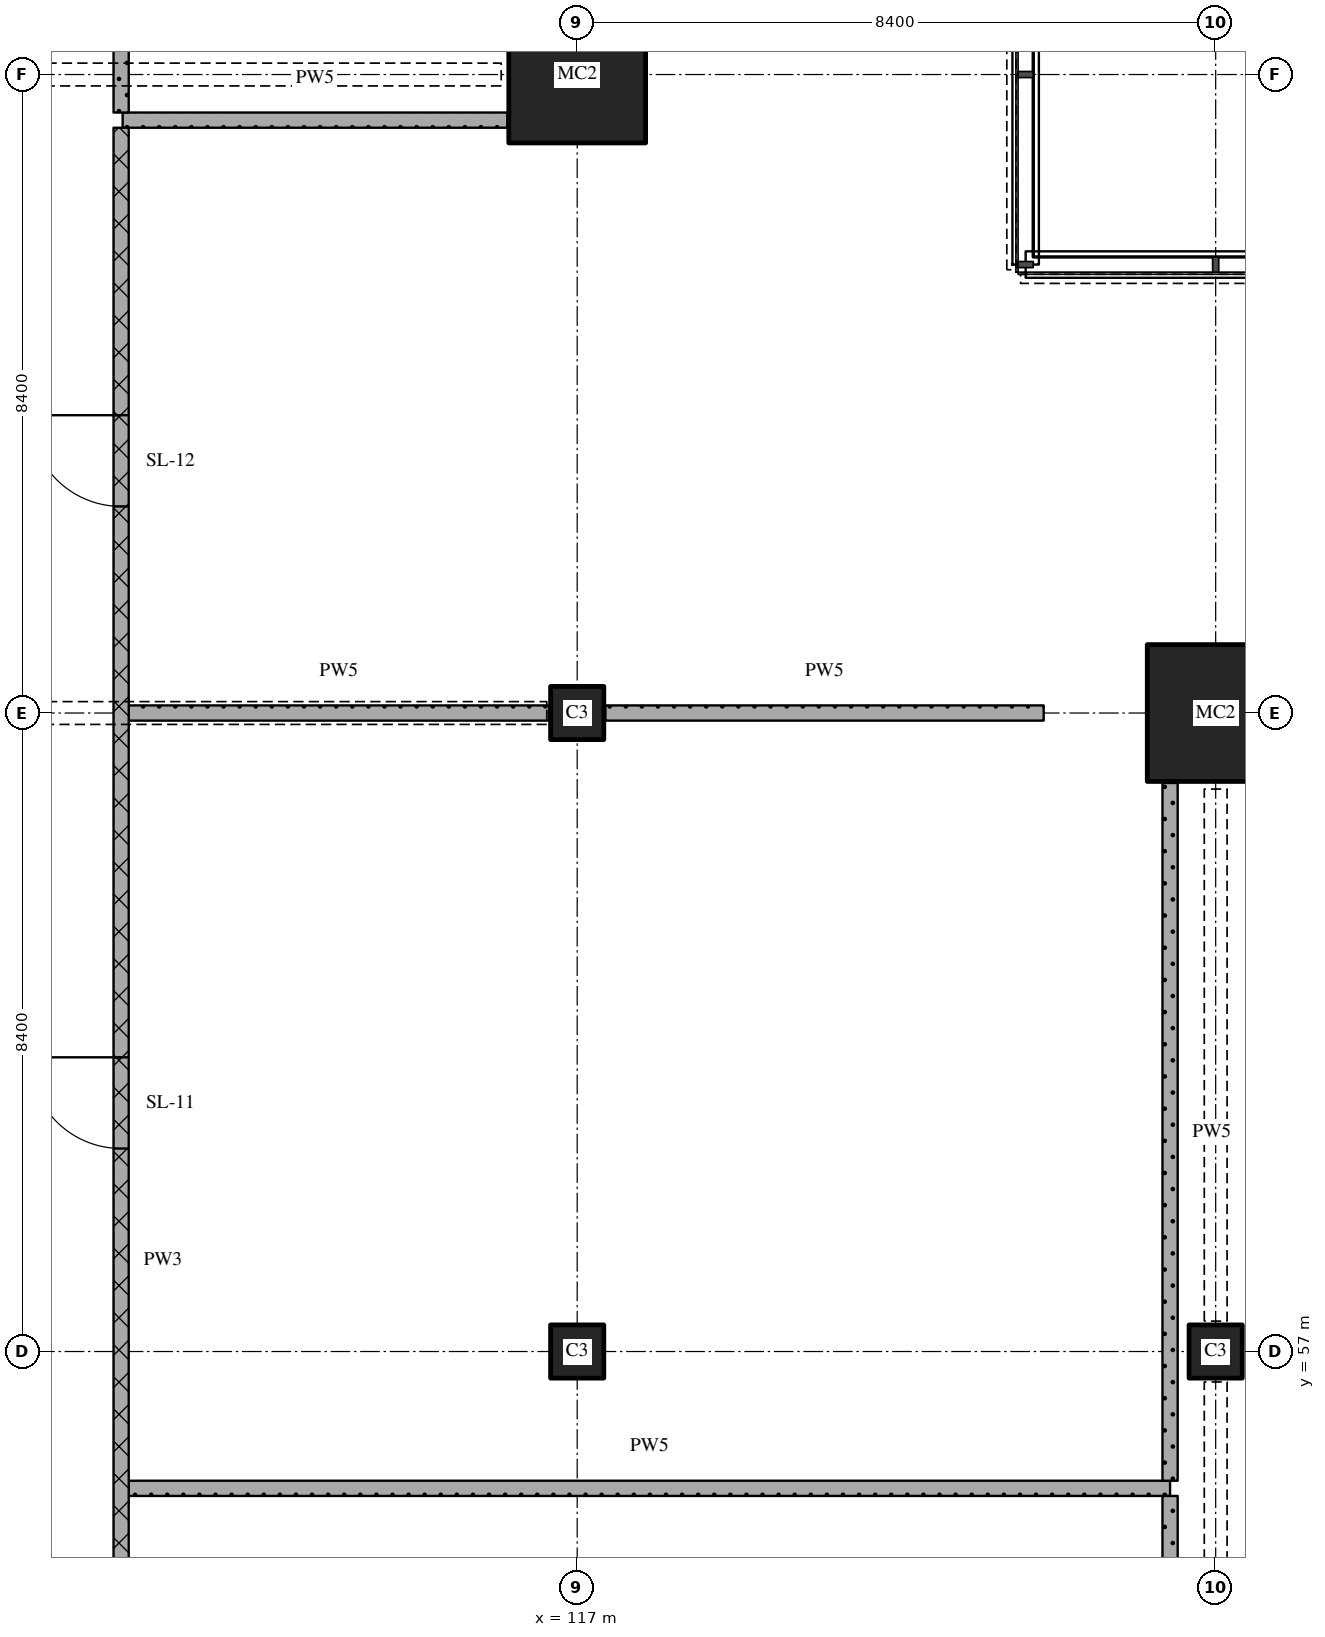
"""IFC4 building model, lengths in metres.
Left out: names, types, materials, properties, quantities, classifications, styles, units other than length and angle.
Written with IfcOpenShell. Run it as: python <this file> out.ifc"""

import sys

from ifc_helpers import new_model, si_unit, direction, frame, frame_2d, origin, origin_2d, place, context, subcontext, project, spatial, rectangle, extrude, element, fill, save


model = new_model("IFC4")
c1 = context("Model", 3, precision=1e-05, world=origin(), true_north=direction((0.0, 1.0)))
c2 = subcontext(c1, "Body", "Model", "MODEL_VIEW")
j1 = project(units=[si_unit("LENGTHUNIT", "METRE"), si_unit("PLANEANGLEUNIT", "RADIAN")], contexts=[c1])
p1 = place(None, origin())
s1 = spatial("IfcSite", under=j1, at=p1, CompositionType="ELEMENT")
p2 = place(p1, origin())
s2 = spatial("IfcBuilding", under=s1, at=p2, CompositionType="ELEMENT")
p3 = place(p2, frame((0.0, 0.0, 142.05)))
s3 = spatial("IfcBuildingStorey", under=s2, at=p3, CompositionType="ELEMENT", Elevation=142.05)
for number, where, z_axis, x_axis in (
    (1, (117.0, 57.0, 0.0), (0.0, 0.0, 1.0), (1.0, 0.0, 0.0)),
    (2, (117.0, 65.4, 0.0), (0.0, 0.0, 1.0), (1.0, 0.0, 0.0)),
):
    element("IfcColumn", number, at=place(p3, frame(where, z_axis=z_axis, x_axis=x_axis)), inside=s3, PredefinedType="COLUMN", context=c2, shape_type="SweptSolid", body=[
        extrude(rectangle(XDim=0.7, YDim=0.7, at=origin_2d()), origin(), (0.0, 0.0, 1.0), 5.4),
    ])
p4 = place(p3, frame((117.0, 73.8, 0.0), z_axis=(0.0, 0.0, 1.0), x_axis=(1.0, 0.0, 0.0)))
e3 = element("IfcColumn", 3, at=p4, inside=s3, PredefinedType="COLUMN", context=c2, shape_type="SweptSolid", body=[
    extrude(rectangle(XDim=1.8, YDim=1.8, at=origin_2d()), origin(), (0.0, 0.0, 1.0), 5.4),
])
p5 = place(p3, frame((125.4, 57.0, 0.0), z_axis=(0.0, 0.0, 1.0), x_axis=(1.0, 0.0, 0.0)))
e4 = element("IfcColumn", 4, at=p5, inside=s3, PredefinedType="COLUMN", context=c2, shape_type="SweptSolid", body=[
    extrude(rectangle(XDim=0.7, YDim=0.7, at=origin_2d()), origin(), (0.0, 0.0, 1.0), 5.4),
])
p6 = place(p3, frame((125.4, 65.4, 0.0), z_axis=(0.0, 0.0, 1.0), x_axis=(1.0, 0.0, 0.0)))
e5 = element("IfcColumn", 5, at=p6, inside=s3, PredefinedType="COLUMN", context=c2, shape_type="SweptSolid", body=[
    extrude(rectangle(XDim=1.8, YDim=1.8, at=origin_2d()), origin(), (0.0, 0.0, 1.0), 5.4),
])
p7 = place(p3, frame((111.1, 55.2, 0.0), z_axis=(0.0, 0.0, 1.0), x_axis=(1.0, 0.0, 0.0)))
e6 = element("IfcWall", 6, at=p7, inside=s3, PredefinedType="PARTITIONING", context=c2, shape_type="SweptSolid", body=[
    extrude(rectangle(XDim=13.7, YDim=0.2, at=frame_2d((6.85, 0.0))), origin(), (0.0, 0.0, 1.0), 5.12),
])
p8 = place(p3, frame((111.1, 65.4, 0.0), z_axis=(0.0, 0.0, 1.0), x_axis=(1.0, 0.0, 0.0)))
e7 = element("IfcWall", 7, at=p8, inside=s3, PredefinedType="PARTITIONING", context=c2, shape_type="SweptSolid", body=[
    extrude(rectangle(XDim=5.53, YDim=0.2, at=frame_2d((2.765, 0.0))), origin(), (0.0, 0.0, 1.0), 4.67),
])
p9 = place(p3, frame((117.37, 65.4, 0.0), z_axis=(0.0, 0.0, 1.0), x_axis=(1.0, 0.0, 0.0)))
e8 = element("IfcWall", 8, at=p9, inside=s3, PredefinedType="PARTITIONING", context=c2, shape_type="SweptSolid", body=[
    extrude(rectangle(XDim=5.767, YDim=0.2, at=frame_2d((2.884, 0.0))), origin(), (0.0, 0.0, 1.0), 5.12),
])
p10 = place(p3, frame((111.02, 73.2, 0.0), z_axis=(0.0, 0.0, 1.0), x_axis=(1.0, 0.0, 0.0)))
e9 = element("IfcWall", 9, at=p10, inside=s3, PredefinedType="PARTITIONING", context=c2, shape_type="SweptSolid", body=[
    extrude(rectangle(XDim=5.06, YDim=0.2, at=frame_2d((2.53, 0.0))), origin(), (0.0, 0.0, 1.0), 5.12),
])
p11 = place(p3, frame((111.0, 73.1, 0.0), z_axis=(0.0, 0.0, 1.0), x_axis=(0.0, -1.0, 0.0)))
e10 = element("IfcWall", 10, at=p11, inside=s3, PredefinedType="PARTITIONING", context=c2, shape_type="SweptSolid", body=[
    extrude(rectangle(XDim=29.8, YDim=0.2, at=frame_2d((14.9, 0.0))), origin(), (0.0, 0.0, 1.0), 5.12),
])
p12 = place(p11, frame((3.782, 0.0, 0.0)))
e11 = element("IfcOpeningElement", 11, at=p12, cuts=e10, PredefinedType="OPENING", context=c2, shape_type="SweptSolid", body=[
    extrude(rectangle(XDim=1.2, YDim=2.1, at=frame_2d((0.6, 1.05))), frame((0.0, 0.11, 0.0), z_axis=(0.0, -1.0, 0.0), x_axis=(1.0, 0.0, 0.0)), (0.0, 0.0, 1.0), 0.22),
])
p13 = place(p11, frame((12.229, 0.0, 0.0)))
e12 = element("IfcOpeningElement", 12, at=p13, cuts=e10, PredefinedType="OPENING", context=c2, shape_type="SweptSolid", body=[
    extrude(rectangle(XDim=1.2, YDim=2.1, at=frame_2d((0.6, 1.05))), frame((0.0, 0.11, 0.0), z_axis=(0.0, -1.0, 0.0), x_axis=(1.0, 0.0, 0.0)), (0.0, 0.0, 1.0), 0.22),
])
p14 = place(p11, frame((21.05, 0.0, 0.0)))
e13 = element("IfcOpeningElement", 13, at=p14, cuts=e10, PredefinedType="OPENING", context=c2, shape_type="SweptSolid", body=[
    extrude(rectangle(XDim=1.2, YDim=2.1, at=frame_2d((0.6, 1.05))), frame((0.0, 0.11, 0.0), z_axis=(0.0, -1.0, 0.0), x_axis=(1.0, 0.0, 0.0)), (0.0, 0.0, 1.0), 0.22),
])
p15 = place(p3, frame((111.0, 75.3, 0.0), z_axis=(0.0, 0.0, 1.0), x_axis=(0.0, -1.0, 0.0)))
e14 = element("IfcWall", 14, at=p15, inside=s3, PredefinedType="PARTITIONING", context=c2, shape_type="SweptSolid", body=[
    extrude(rectangle(XDim=2.0, YDim=0.2, at=frame_2d((1.0, 0.0))), origin(), (0.0, 0.0, 1.0), 5.12),
])
p16 = place(p3, frame((124.8, 55.1, 0.0), z_axis=(0.0, 0.0, 1.0), x_axis=(0.0, -1.0, 0.0)))
e15 = element("IfcWall", 15, at=p16, inside=s3, PredefinedType="PARTITIONING", context=c2, shape_type="SweptSolid", body=[
    extrude(rectangle(XDim=11.8, YDim=0.2, at=frame_2d((5.9, 0.0))), origin(), (0.0, 0.0, 1.0), 5.12),
])
p17 = place(p3, frame((124.8, 64.48, 0.0), z_axis=(0.0, 0.0, 1.0), x_axis=(0.0, -1.0, 0.0)))
e16 = element("IfcWall", 16, at=p17, inside=s3, PredefinedType="PARTITIONING", context=c2, shape_type="SweptSolid", body=[
    extrude(rectangle(XDim=9.18, YDim=0.2, at=frame_2d((4.59, 0.0))), origin(), (0.0, 0.0, 1.0), 5.12),
])
p18 = place(p12, origin())
e17 = element("IfcDoor", 17, at=p18, inside=s3, OperationType="SINGLE_SWING_RIGHT", PredefinedType="DOOR", context=c2, shape_type="SweptSolid", body=[
    extrude(rectangle(XDim=1.2, YDim=2.1, at=frame_2d((0.6, 1.05))), frame((0.0, 0.025, 0.0), z_axis=(0.0, -1.0, 0.0), x_axis=(1.0, 0.0, 0.0)), (0.0, 0.0, 1.0), 0.05),
])
fill(e11, e17)
p19 = place(p13, origin())
e18 = element("IfcDoor", 18, at=p19, inside=s3, OperationType="SINGLE_SWING_RIGHT", PredefinedType="DOOR", context=c2, shape_type="SweptSolid", body=[
    extrude(rectangle(XDim=1.2, YDim=2.1, at=frame_2d((0.6, 1.05))), frame((0.0, 0.025, 0.0), z_axis=(0.0, -1.0, 0.0), x_axis=(1.0, 0.0, 0.0)), (0.0, 0.0, 1.0), 0.05),
])
fill(e12, e18)
save(model, sys.argv[1])
